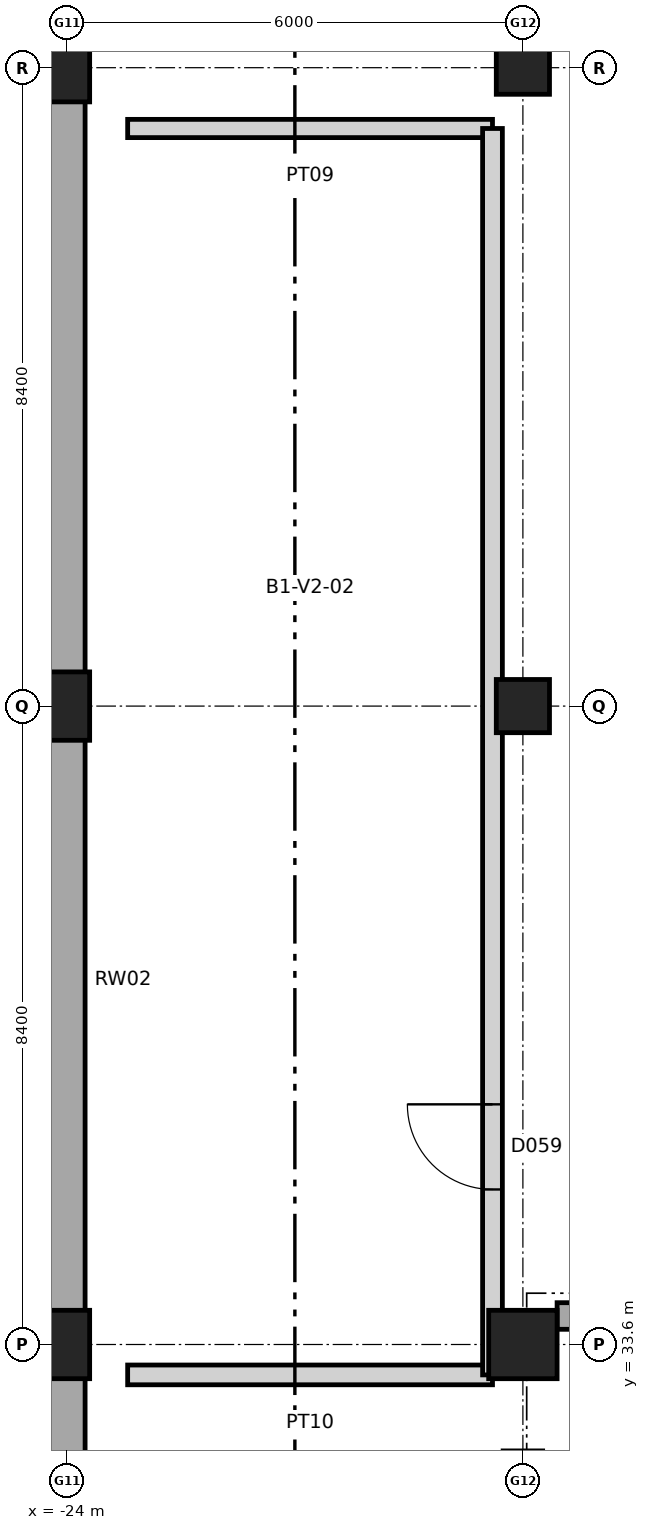
"""IFC4 building model, lengths in metres.
Left out: names, types, materials, properties, quantities, classifications, styles, units other than length and angle.
Written with IfcOpenShell. Run it as: python <this file> out.ifc"""

import sys

from ifc_helpers import new_model, si_unit, direction, frame, frame_2d, origin, origin_2d, place, context, subcontext, project, spatial, rectangle, extrude, element, fill, save


model = new_model("IFC4")
c1 = context("Model", 3, precision=1e-05, world=origin(), true_north=direction((0.0, 1.0)))
c2 = subcontext(c1, "Body", "Model", "MODEL_VIEW")
j1 = project(units=[si_unit("LENGTHUNIT", "METRE"), si_unit("PLANEANGLEUNIT", "RADIAN")], contexts=[c1])
p1 = place(None, origin())
s1 = spatial("IfcSite", under=j1, at=p1, CompositionType="ELEMENT")
p2 = place(p1, origin())
s2 = spatial("IfcBuilding", under=s1, at=p2, CompositionType="ELEMENT")
p3 = place(p2, frame((0.0, 0.0, -5.4)))
s3 = spatial("IfcBuildingStorey", under=s2, at=p3, CompositionType="ELEMENT", Elevation=-5.4)
for number, where, z_axis, x_axis in (
    (1, (-24.0, 33.6, 0.0), (0.0, 0.0, 1.0), (1.0, 0.0, 0.0)),
    (2, (-24.0, 42.0, 0.0), (0.0, 0.0, 1.0), (1.0, 0.0, 0.0)),
    (3, (-24.0, 50.4, 0.0), (0.0, 0.0, 1.0), (1.0, 0.0, 0.0)),
):
    element("IfcColumn", number, at=place(p3, frame(where, z_axis=z_axis, x_axis=x_axis)), inside=s3, PredefinedType="COLUMN", context=c2, shape_type="SweptSolid", body=[
        extrude(rectangle(XDim=0.6, YDim=0.9, at=origin_2d()), origin(), (0.0, 0.0, 1.0), 5.4),
    ])
p4 = place(p3, frame((-18.0, 33.6, 0.0), z_axis=(0.0, 0.0, 1.0), x_axis=(1.0, 0.0, 0.0)))
e4 = element("IfcColumn", 4, at=p4, inside=s3, PredefinedType="COLUMN", context=c2, shape_type="SweptSolid", body=[
    extrude(rectangle(XDim=0.9, YDim=0.9, at=origin_2d()), origin(), (0.0, 0.0, 1.0), 5.4),
])
for number, where, z_axis, x_axis in (
    (5, (-18.0, 42.0, 0.0), (0.0, 0.0, 1.0), (1.0, 0.0, 0.0)),
    (6, (-18.0, 50.4, 0.0), (0.0, 0.0, 1.0), (1.0, 0.0, 0.0)),
):
    element("IfcColumn", number, at=place(p3, frame(where, z_axis=z_axis, x_axis=x_axis)), inside=s3, PredefinedType="COLUMN", context=c2, shape_type="SweptSolid", body=[
        extrude(rectangle(XDim=0.7, YDim=0.7, at=origin_2d()), origin(), (0.0, 0.0, 1.0), 5.4),
    ])
p5 = place(p3, frame((-24.0, 17.85, 0.0), z_axis=(0.0, 0.0, 1.0), x_axis=(0.0, 1.0, 0.0)))
e7 = element("IfcWall", 7, at=p5, inside=s3, PredefinedType="USERDEFINED", context=c2, shape_type="SweptSolid", body=[
    extrude(rectangle(XDim=41.1, YDim=0.48, at=frame_2d((20.55, 0.0))), origin(), (0.0, 0.0, 1.0), 5.11),
])
p6 = place(p3, frame((-18.0, 18.0, 0.0), z_axis=(0.0, 0.0, 1.0), x_axis=(0.0, 1.0, 0.0)))
e8 = element("IfcWall", 8, at=p6, inside=s3, PredefinedType="SHEAR", context=c2, shape_type="SweptSolid", body=[
    extrude(rectangle(XDim=14.2, YDim=0.52, at=frame_2d((7.1, 0.0))), origin(), (0.0, 0.0, 1.0), 5.4),
])
p7 = place(p3, frame((-17.55, 33.975, 0.0), z_axis=(0.0, 0.0, 1.0), x_axis=(1.0, 0.0, 0.0)))
e9 = element("IfcWall", 9, at=p7, inside=s3, PredefinedType="SHEAR", context=c2, shape_type="SweptSolid", body=[
    extrude(rectangle(XDim=5.1, YDim=0.35, at=frame_2d((2.55, 0.0))), origin(), (0.0, 0.0, 1.0), 5.4),
])
p8 = place(p7, frame((3.07, 0.0, 0.0)))
e10 = element("IfcOpeningElement", 10, at=p8, cuts=e9, PredefinedType="OPENING", context=c2, shape_type="SweptSolid", body=[
    extrude(rectangle(XDim=1.18, YDim=2.15, at=frame_2d((0.59, 1.075))), frame((0.0, 0.185, 0.0), z_axis=(0.0, -1.0, 0.0), x_axis=(1.0, 0.0, 0.0)), (0.0, 0.0, 1.0), 0.37),
])
p9 = place(p3, frame((-23.2, 33.2, 0.0), z_axis=(0.0, 0.0, 1.0), x_axis=(1.0, 0.0, 0.0)))
e11 = element("IfcWall", 11, at=p9, inside=s3, PredefinedType="PARTITIONING", context=c2, shape_type="SweptSolid", body=[
    extrude(rectangle(XDim=4.8, YDim=0.26, at=frame_2d((2.4, 0.0))), origin(), (0.0, 0.0, 1.0), 5.02),
])
p10 = place(p3, frame((-23.2, 49.6, 0.0), z_axis=(0.0, 0.0, 1.0), x_axis=(1.0, 0.0, 0.0)))
e12 = element("IfcWall", 12, at=p10, inside=s3, PredefinedType="PARTITIONING", context=c2, shape_type="SweptSolid", body=[
    extrude(rectangle(XDim=4.8, YDim=0.24, at=frame_2d((2.4, 0.0))), origin(), (0.0, 0.0, 1.0), 5.02),
])
p11 = place(p3, frame((-18.4, 33.2, 0.0), z_axis=(0.0, 0.0, 1.0), x_axis=(0.0, 1.0, 0.0)))
e13 = element("IfcWall", 13, at=p11, inside=s3, PredefinedType="PARTITIONING", context=c2, shape_type="SweptSolid", body=[
    extrude(rectangle(XDim=16.4, YDim=0.26, at=frame_2d((8.2, 0.0))), origin(), (0.0, 0.0, 1.0), 4.22),
])
p12 = place(p11, frame((2.44, 0.0, 0.0)))
e14 = element("IfcOpeningElement", 14, at=p12, cuts=e13, PredefinedType="OPENING", context=c2, shape_type="SweptSolid", body=[
    extrude(rectangle(XDim=1.12, YDim=2.25, at=frame_2d((0.56, 1.125))), frame((0.0, 0.14, 0.0), z_axis=(0.0, -1.0, 0.0), x_axis=(1.0, 0.0, 0.0)), (0.0, 0.0, 1.0), 0.28),
])
p13 = place(p12, origin())
e15 = element("IfcDoor", 15, at=p13, inside=s3, OperationType="SINGLE_SWING_RIGHT", PredefinedType="DOOR", context=c2, shape_type="SweptSolid", body=[
    extrude(rectangle(XDim=1.12, YDim=2.25, at=frame_2d((0.56, 1.125))), frame((0.0, 0.025, 0.0), z_axis=(0.0, -1.0, 0.0), x_axis=(1.0, 0.0, 0.0)), (0.0, 0.0, 1.0), 0.05),
])
fill(e14, e15)
save(model, sys.argv[1])
